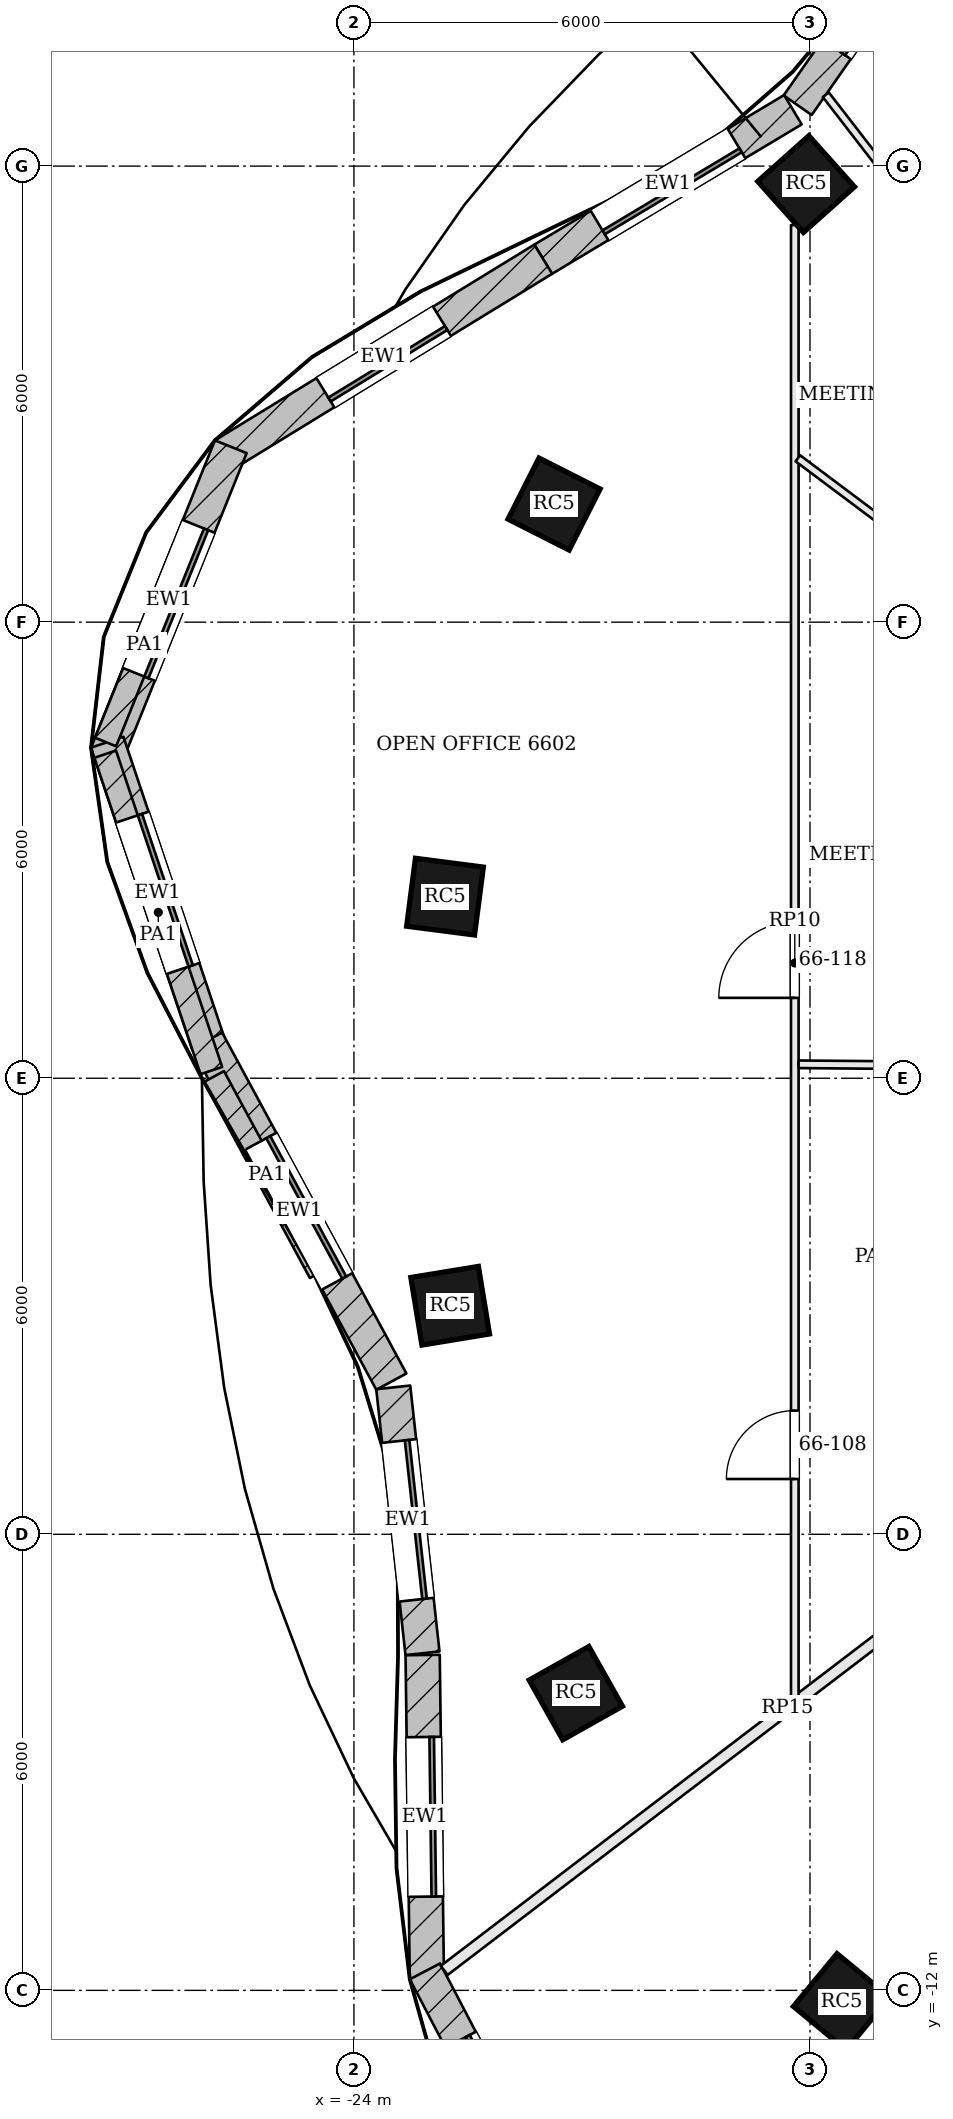
"""IFC4 building model, lengths in metres.
Left out: names, types, materials, properties, quantities, classifications, styles, units other than length and angle.
Written with IfcOpenShell. Run it as: python <this file> out.ifc"""

import sys

from ifc_helpers import new_model, si_unit, direction, frame, frame_2d, origin, origin_2d, place, context, subcontext, project, spatial, rectangle, extrude, element, fill, save


model = new_model("IFC4")
c1 = context("Model", 3, precision=1e-05, world=origin(), true_north=direction((0.0, 1.0)))
c2 = subcontext(c1, "Body", "Model", "MODEL_VIEW")
j1 = project(units=[si_unit("LENGTHUNIT", "METRE"), si_unit("PLANEANGLEUNIT", "RADIAN")], contexts=[c1])
p1 = place(None, origin())
s1 = spatial("IfcSite", under=j1, at=p1, CompositionType="ELEMENT")
p2 = place(p1, origin())
s2 = spatial("IfcBuilding", under=s1, at=p2, CompositionType="ELEMENT")
p3 = place(p2, frame((0.0, 0.0, 268.8)))
s3 = spatial("IfcBuildingStorey", under=s2, at=p3, CompositionType="ELEMENT", Elevation=268.8)
for number, where, z_axis, x_axis in (
    (1, (-18.051, 11.763, -0.7), (0.0, 0.0, 1.0), (-0.746, -0.666, 0.0)),
    (2, (-21.367, 7.554, -0.7), (0.0, 0.0, 1.0), (-0.452, -0.892, 0.0)),
    (3, (-22.802, 2.389, -0.7), (0.0, 0.0, 1.0), (-0.129, -0.992, 0.0)),
    (4, (-22.734, -2.993, -0.7), (0.0, 0.0, 1.0), (0.162, -0.987, 0.0)),
    (5, (-21.081, -8.09, -0.7), (0.0, 0.0, 1.0), (0.49, -0.872, 0.0)),
    (6, (-17.584, -12.151, -0.7), (0.0, 0.0, 1.0), (0.771, -0.637, 0.0)),
):
    element("IfcColumn", number, at=place(p3, frame(where, z_axis=z_axis, x_axis=x_axis)), inside=s3, PredefinedType="COLUMN", context=c2, shape_type="SweptSolid", body=[
        extrude(rectangle(XDim=0.9, YDim=0.9, at=origin_2d()), origin(), (0.0, 0.0, 1.0), 4.6),
    ])
p4 = place(p3, frame((-15.931, 15.993, 0.0), z_axis=(0.0, 0.0, 1.0), x_axis=(-0.572923675708, -0.819608724828, 0.0)))
e7 = element("IfcWall", 7, at=p4, inside=s3, PredefinedType="SOLIDWALL", context=c2, shape_type="SweptSolid", body=[
    extrude(rectangle(XDim=3.895, YDim=0.45, at=frame_2d((1.947, 0.0))), origin(), (0.0, 0.0, 1.0), 3.7),
])
p5 = place(p4, frame((0.897, 0.0, 0.9)))
e8 = element("IfcOpeningElement", 8, at=p5, cuts=e7, PredefinedType="OPENING", context=c2, shape_type="SweptSolid", body=[
    extrude(rectangle(XDim=2.1, YDim=2.3, at=frame_2d((1.05, 1.15))), frame((0.0, 0.235, 0.0), z_axis=(0.0, -1.0, 0.0), x_axis=(1.0, 0.0, 0.0)), (0.0, 0.0, 1.0), 0.47),
])
p6 = place(p3, frame((-18.225, 12.742, 0.0), z_axis=(0.0, 0.0, 1.0), x_axis=(-0.857965073766, -0.513708022322, 0.0)))
e9 = element("IfcWall", 9, at=p6, inside=s3, PredefinedType="SOLIDWALL", context=c2, shape_type="SweptSolid", body=[
    extrude(rectangle(XDim=3.83, YDim=0.45, at=frame_2d((1.915, 0.0))), origin(), (0.0, 0.0, 1.0), 3.7),
])
p7 = place(p6, frame((0.865, 0.0, 0.9)))
e10 = element("IfcOpeningElement", 10, at=p7, cuts=e9, PredefinedType="OPENING", context=c2, shape_type="SweptSolid", body=[
    extrude(rectangle(XDim=2.1, YDim=2.3, at=frame_2d((1.05, 1.15))), frame((0.0, 0.235, 0.0), z_axis=(0.0, -1.0, 0.0), x_axis=(1.0, 0.0, 0.0)), (0.0, 0.0, 1.0), 0.47),
])
p8 = place(p3, frame((-21.51, 10.775, 0.0), z_axis=(0.0, 0.0, 1.0), x_axis=(-0.852642584462, -0.522494615439, 0.0)))
e11 = element("IfcWall", 11, at=p8, inside=s3, PredefinedType="SOLIDWALL", context=c2, shape_type="SweptSolid", body=[
    extrude(rectangle(XDim=4.924, YDim=0.45, at=frame_2d((2.462, 0.0))), origin(), (0.0, 0.0, 1.0), 3.7),
])
p9 = place(p8, frame((1.562, 0.0, 0.9)))
e12 = element("IfcOpeningElement", 12, at=p9, cuts=e11, PredefinedType="OPENING", context=c2, shape_type="SweptSolid", body=[
    extrude(rectangle(XDim=1.8, YDim=2.3, at=frame_2d((0.9, 1.15))), frame((0.0, 0.235, 0.0), z_axis=(0.0, -1.0, 0.0), x_axis=(1.0, 0.0, 0.0)), (0.0, 0.0, 1.0), 0.47),
])
p10 = place(p3, frame((-25.62, 8.308, 0.0), z_axis=(0.0, 0.0, 1.0), x_axis=(-0.373899958574, -0.927469040442, 0.0)))
e13 = element("IfcWall", 13, at=p10, inside=s3, PredefinedType="SOLIDWALL", context=c2, shape_type="SweptSolid", body=[
    extrude(rectangle(XDim=4.359, YDim=0.45, at=frame_2d((2.18, 0.0))), origin(), (0.0, 0.0, 1.0), 3.7),
])
p11 = place(p10, frame((1.13, 0.0, 0.9)))
e14 = element("IfcOpeningElement", 14, at=p11, cuts=e13, PredefinedType="OPENING", context=c2, shape_type="SweptSolid", body=[
    extrude(rectangle(XDim=2.1, YDim=2.3, at=frame_2d((1.05, 1.15))), frame((0.0, 0.235, 0.0), z_axis=(0.0, -1.0, 0.0), x_axis=(1.0, 0.0, 0.0)), (0.0, 0.0, 1.0), 0.47),
])
p12 = place(p3, frame((-27.246, 4.421, 0.0), z_axis=(0.0, 0.0, 1.0), x_axis=(0.318014723139, -0.94808577453, 0.0)))
e15 = element("IfcWall", 15, at=p12, inside=s3, PredefinedType="SOLIDWALL", context=c2, shape_type="SweptSolid", body=[
    extrude(rectangle(XDim=4.179, YDim=0.45, at=frame_2d((2.09, 0.0))), origin(), (0.0, 0.0, 1.0), 3.7),
])
p13 = place(p12, frame((1.04, 0.0, 0.9)))
e16 = element("IfcOpeningElement", 16, at=p13, cuts=e15, PredefinedType="OPENING", context=c2, shape_type="SweptSolid", body=[
    extrude(rectangle(XDim=2.1, YDim=2.3, at=frame_2d((1.05, 1.15))), frame((0.0, 0.235, 0.0), z_axis=(0.0, -1.0, 0.0), x_axis=(1.0, 0.0, 0.0)), (0.0, 0.0, 1.0), 0.47),
])
p14 = place(p3, frame((-25.932, 0.494, 0.0), z_axis=(0.0, 0.0, 1.0), x_axis=(0.475489989979, -0.879721131626, 0.0)))
e17 = element("IfcWall", 17, at=p14, inside=s3, PredefinedType="SOLIDWALL", context=c2, shape_type="SweptSolid", body=[
    extrude(rectangle(XDim=5.098, YDim=0.45, at=frame_2d((2.549, 0.0))), origin(), (0.0, 0.0, 1.0), 3.7),
])
p15 = place(p14, frame((1.499, 0.0, 0.9)))
e18 = element("IfcOpeningElement", 18, at=p15, cuts=e17, PredefinedType="OPENING", context=c2, shape_type="SweptSolid", body=[
    extrude(rectangle(XDim=2.1, YDim=2.3, at=frame_2d((1.05, 1.15))), frame((0.0, 0.235, 0.0), z_axis=(0.0, -1.0, 0.0), x_axis=(1.0, 0.0, 0.0)), (0.0, 0.0, 1.0), 0.47),
])
p16 = place(p3, frame((-23.483, -4.067, 0.0), z_axis=(0.0, 0.0, 1.0), x_axis=(0.109342535662, -0.994004129717, 0.0)))
e19 = element("IfcWall", 19, at=p16, inside=s3, PredefinedType="SOLIDWALL", context=c2, shape_type="SweptSolid", body=[
    extrude(rectangle(XDim=3.519, YDim=0.45, at=frame_2d((1.759, 0.0))), origin(), (0.0, 0.0, 1.0), 3.7),
])
p17 = place(p16, frame((0.709, 0.0, 0.9)))
e20 = element("IfcOpeningElement", 20, at=p17, cuts=e19, PredefinedType="OPENING", context=c2, shape_type="SweptSolid", body=[
    extrude(rectangle(XDim=2.1, YDim=2.3, at=frame_2d((1.05, 1.15))), frame((0.0, 0.235, 0.0), z_axis=(0.0, -1.0, 0.0), x_axis=(1.0, 0.0, 0.0)), (0.0, 0.0, 1.0), 0.47),
])
p18 = place(p3, frame((-23.096, -7.588, 0.0), z_axis=(0.0, 0.0, 1.0), x_axis=(0.013129602116, -0.999913803059, 0.0)))
e21 = element("IfcWall", 21, at=p18, inside=s3, PredefinedType="SOLIDWALL", context=c2, shape_type="SweptSolid", body=[
    extrude(rectangle(XDim=4.258, YDim=0.45, at=frame_2d((2.129, 0.0))), origin(), (0.0, 0.0, 1.0), 3.7),
])
p19 = place(p18, frame((1.079, 0.0, 0.9)))
e22 = element("IfcOpeningElement", 22, at=p19, cuts=e21, PredefinedType="OPENING", context=c2, shape_type="SweptSolid", body=[
    extrude(rectangle(XDim=2.1, YDim=2.3, at=frame_2d((1.05, 1.15))), frame((0.0, 0.235, 0.0), z_axis=(0.0, -1.0, 0.0), x_axis=(1.0, 0.0, 0.0)), (0.0, 0.0, 1.0), 0.47),
])
p20 = place(p3, frame((-23.066, -11.75, 0.0), z_axis=(0.0, 0.0, 1.0), x_axis=(0.46287314096, -0.886424534508, 0.0)))
e23 = element("IfcWall", 23, at=p20, inside=s3, PredefinedType="SOLIDWALL", context=c2, shape_type="SweptSolid", body=[
    extrude(rectangle(XDim=4.129, YDim=0.45, at=frame_2d((2.064, 0.0))), origin(), (0.0, 0.0, 1.0), 3.7),
])
p21 = place(p20, frame((1.014, 0.0, 0.9)))
e24 = element("IfcOpeningElement", 24, at=p21, cuts=e23, PredefinedType="OPENING", context=c2, shape_type="SweptSolid", body=[
    extrude(rectangle(XDim=2.1, YDim=2.3, at=frame_2d((1.05, 1.15))), frame((0.0, 0.235, 0.0), z_axis=(0.0, -1.0, 0.0), x_axis=(1.0, 0.0, 0.0)), (0.0, 0.0, 1.0), 0.47),
])
p22 = place(p3, frame((-26.235, 6.983, 3.9), z_axis=(0.0, 0.0, 1.0), x_axis=(-0.373951156773, -0.927448398752, 0.0)))
e25 = element("IfcWall", 25, at=p22, inside=s3, PredefinedType="PARAPET", context=c2, shape_type="SweptSolid", body=[
    extrude(rectangle(XDim=2.76, YDim=0.3, at=frame_2d((1.38, 0.0))), origin(), (0.0, 0.0, 1.0), 1.1),
])
p23 = place(p3, frame((-27.272, 4.263, 3.9), z_axis=(0.0, 0.0, 1.0), x_axis=(0.318062148405, -0.948069865438, 0.0)))
e26 = element("IfcWall", 26, at=p23, inside=s3, PredefinedType="PARAPET", context=c2, shape_type="SweptSolid", body=[
    extrude(rectangle(XDim=4.391, YDim=0.3, at=frame_2d((2.195, 0.0))), origin(), (0.0, 0.0, 1.0), 1.1),
])
p24 = place(p3, frame((-25.842, 0.022, 3.9), z_axis=(0.0, 0.0, 1.0), x_axis=(0.475470000897, -0.879731935448, 0.0)))
e27 = element("IfcWall", 27, at=p24, inside=s3, PredefinedType="PARAPET", context=c2, shape_type="SweptSolid", body=[
    extrude(rectangle(XDim=2.931, YDim=0.3, at=frame_2d((1.466, 0.0))), origin(), (0.0, 0.0, 1.0), 1.1),
])
p25 = place(p3, frame((-22.812, -11.738, 0.0), z_axis=(0.0, 0.0, 1.0), x_axis=(0.794974700279, 0.606642584984, 0.0)))
e28 = element("IfcWall", 28, at=p25, inside=s3, PredefinedType="PARTITIONING", context=c2, shape_type="SweptSolid", body=[
    extrude(rectangle(XDim=11.361, YDim=0.15, at=frame_2d((5.681, 0.0))), origin(), (0.0, 0.0, 1.0), 3.184),
])
p26 = place(p3, frame((-18.2, -8.193, 0.0), z_axis=(0.0, 0.0, 1.0), x_axis=(0.0, 1.0, 0.0)))
e29 = element("IfcWall", 29, at=p26, inside=s3, PredefinedType="PARTITIONING", context=c2, shape_type="SweptSolid", body=[
    extrude(rectangle(XDim=19.417, YDim=0.1, at=frame_2d((9.708, 0.0))), origin(), (0.0, 0.0, 1.0), 3.184),
])
p27 = place(p26, frame((2.92, 0.0, 0.0)))
e30 = element("IfcOpeningElement", 30, at=p27, cuts=e29, PredefinedType="OPENING", context=c2, shape_type="SweptSolid", body=[
    extrude(rectangle(XDim=0.9, YDim=2.1, at=frame_2d((0.45, 1.05))), frame((0.0, 0.06, 0.0), z_axis=(0.0, -1.0, 0.0), x_axis=(1.0, 0.0, 0.0)), (0.0, 0.0, 1.0), 0.12),
])
p28 = place(p26, frame((9.25, 0.0, 0.0)))
e31 = element("IfcOpeningElement", 31, at=p28, cuts=e29, PredefinedType="OPENING", context=c2, shape_type="SweptSolid", body=[
    extrude(rectangle(XDim=1.0, YDim=2.4, at=frame_2d((0.5, 1.2))), frame((0.0, 0.06, 0.0), z_axis=(0.0, -1.0, 0.0), x_axis=(1.0, 0.0, 0.0)), (0.0, 0.0, 1.0), 0.12),
])
p29 = place(p3, frame((-14.846, 9.129, 0.0), z_axis=(0.0, 0.0, 1.0), x_axis=(-0.611737488733, 0.791060835132, 0.0)))
e32 = element("IfcWall", 32, at=p29, inside=s3, PredefinedType="PARTITIONING", context=c2, shape_type="SweptSolid", body=[
    extrude(rectangle(XDim=4.815, YDim=0.1, at=frame_2d((2.408, 0.0))), origin(), (0.0, 0.0, 1.0), 3.184),
])
p30 = place(p3, frame((-14.86, 5.685, 0.0), z_axis=(0.0, 0.0, 1.0), x_axis=(-0.800426186609, 0.599431330338, 0.0)))
e33 = element("IfcWall", 33, at=p30, inside=s3, PredefinedType="PARTITIONING", context=c2, shape_type="SweptSolid", body=[
    extrude(rectangle(XDim=4.123, YDim=0.1, at=frame_2d((2.061, 0.0))), origin(), (0.0, 0.0, 1.0), 3.184),
])
p31 = place(p3, frame((-14.875, 0.155, 0.0), z_axis=(0.0, 0.0, 1.0), x_axis=(-0.999962610899, 0.008647358198, 0.0)))
e34 = element("IfcWall", 34, at=p31, inside=s3, PredefinedType="PARTITIONING", context=c2, shape_type="SweptSolid", body=[
    extrude(rectangle(XDim=3.275, YDim=0.1, at=frame_2d((1.638, 0.0))), origin(), (0.0, 0.0, 1.0), 3.184),
])
p32 = place(p5, origin())
e35 = element("IfcWindow", 35, at=p32, inside=s3, PartitioningType="SINGLE_PANEL", PredefinedType="WINDOW", context=c2, shape_type="SweptSolid", body=[
    extrude(rectangle(XDim=2.1, YDim=2.3, at=frame_2d((1.05, 1.15))), frame((0.0, 0.135, 0.0), z_axis=(0.0, -1.0, 0.0), x_axis=(1.0, 0.0, 0.0)), (0.0, 0.0, 1.0), 0.06),
])
fill(e8, e35)
p33 = place(p7, origin())
e36 = element("IfcWindow", 36, at=p33, inside=s3, PartitioningType="SINGLE_PANEL", PredefinedType="WINDOW", context=c2, shape_type="SweptSolid", body=[
    extrude(rectangle(XDim=2.1, YDim=2.3, at=frame_2d((1.05, 1.15))), frame((0.0, 0.135, 0.0), z_axis=(0.0, -1.0, 0.0), x_axis=(1.0, 0.0, 0.0)), (0.0, 0.0, 1.0), 0.06),
])
fill(e10, e36)
p34 = place(p9, origin())
e37 = element("IfcWindow", 37, at=p34, inside=s3, PartitioningType="SINGLE_PANEL", PredefinedType="WINDOW", context=c2, shape_type="SweptSolid", body=[
    extrude(rectangle(XDim=1.8, YDim=2.3, at=frame_2d((0.9, 1.15))), frame((0.0, 0.135, 0.0), z_axis=(0.0, -1.0, 0.0), x_axis=(1.0, 0.0, 0.0)), (0.0, 0.0, 1.0), 0.06),
])
fill(e12, e37)
p35 = place(p11, origin())
e38 = element("IfcWindow", 38, at=p35, inside=s3, PartitioningType="SINGLE_PANEL", PredefinedType="WINDOW", context=c2, shape_type="SweptSolid", body=[
    extrude(rectangle(XDim=2.1, YDim=2.3, at=frame_2d((1.05, 1.15))), frame((0.0, 0.135, 0.0), z_axis=(0.0, -1.0, 0.0), x_axis=(1.0, 0.0, 0.0)), (0.0, 0.0, 1.0), 0.06),
])
fill(e14, e38)
p36 = place(p13, origin())
e39 = element("IfcWindow", 39, at=p36, inside=s3, PartitioningType="SINGLE_PANEL", PredefinedType="WINDOW", context=c2, shape_type="SweptSolid", body=[
    extrude(rectangle(XDim=2.1, YDim=2.3, at=frame_2d((1.05, 1.15))), frame((0.0, 0.135, 0.0), z_axis=(0.0, -1.0, 0.0), x_axis=(1.0, 0.0, 0.0)), (0.0, 0.0, 1.0), 0.06),
])
fill(e16, e39)
p37 = place(p15, origin())
e40 = element("IfcWindow", 40, at=p37, inside=s3, PartitioningType="SINGLE_PANEL", PredefinedType="WINDOW", context=c2, shape_type="SweptSolid", body=[
    extrude(rectangle(XDim=2.1, YDim=2.3, at=frame_2d((1.05, 1.15))), frame((0.0, 0.135, 0.0), z_axis=(0.0, -1.0, 0.0), x_axis=(1.0, 0.0, 0.0)), (0.0, 0.0, 1.0), 0.06),
])
fill(e18, e40)
p38 = place(p17, origin())
e41 = element("IfcWindow", 41, at=p38, inside=s3, PartitioningType="SINGLE_PANEL", PredefinedType="WINDOW", context=c2, shape_type="SweptSolid", body=[
    extrude(rectangle(XDim=2.1, YDim=2.3, at=frame_2d((1.05, 1.15))), frame((0.0, 0.135, 0.0), z_axis=(0.0, -1.0, 0.0), x_axis=(1.0, 0.0, 0.0)), (0.0, 0.0, 1.0), 0.06),
])
fill(e20, e41)
p39 = place(p19, origin())
e42 = element("IfcWindow", 42, at=p39, inside=s3, PartitioningType="SINGLE_PANEL", PredefinedType="WINDOW", context=c2, shape_type="SweptSolid", body=[
    extrude(rectangle(XDim=2.1, YDim=2.3, at=frame_2d((1.05, 1.15))), frame((0.0, 0.135, 0.0), z_axis=(0.0, -1.0, 0.0), x_axis=(1.0, 0.0, 0.0)), (0.0, 0.0, 1.0), 0.06),
])
fill(e22, e42)
p40 = place(p21, origin())
e43 = element("IfcWindow", 43, at=p40, inside=s3, PartitioningType="SINGLE_PANEL", PredefinedType="WINDOW", context=c2, shape_type="SweptSolid", body=[
    extrude(rectangle(XDim=2.1, YDim=2.3, at=frame_2d((1.05, 1.15))), frame((0.0, 0.135, 0.0), z_axis=(0.0, -1.0, 0.0), x_axis=(1.0, 0.0, 0.0)), (0.0, 0.0, 1.0), 0.06),
])
fill(e24, e43)
p41 = place(p27, origin())
e44 = element("IfcDoor", 44, at=p41, inside=s3, OperationType="SINGLE_SWING_LEFT", PredefinedType="DOOR", context=c2, shape_type="SweptSolid", body=[
    extrude(rectangle(XDim=0.9, YDim=2.1, at=frame_2d((0.45, 1.05))), frame((0.0, 0.025, 0.0), z_axis=(0.0, -1.0, 0.0), x_axis=(1.0, 0.0, 0.0)), (0.0, 0.0, 1.0), 0.05),
])
fill(e30, e44)
p42 = place(p28, origin())
e45 = element("IfcDoor", 45, at=p42, inside=s3, OperationType="SINGLE_SWING_LEFT", PredefinedType="DOOR", context=c2, shape_type="SweptSolid", body=[
    extrude(rectangle(XDim=1.0, YDim=2.4, at=frame_2d((0.5, 1.2))), frame((0.0, 0.025, 0.0), z_axis=(0.0, -1.0, 0.0), x_axis=(1.0, 0.0, 0.0)), (0.0, 0.0, 1.0), 0.05),
])
fill(e31, e45)
save(model, sys.argv[1])
